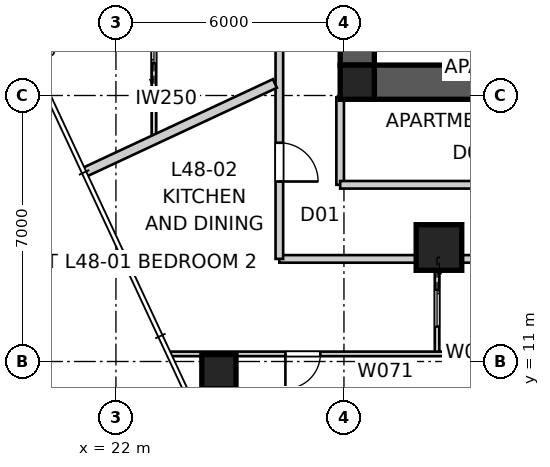
"""IFC4 building model, lengths in metres.
Left out: names, types, materials, properties, quantities, classifications, styles, units other than length and angle.
Written with IfcOpenShell. Run it as: python <this file> out.ifc"""

import sys

from ifc_helpers import new_model, si_unit, direction, frame, frame_2d, origin, origin_2d, place, context, subcontext, project, spatial, polyline, rectangle, outline, extrude, element, fill, save


model = new_model("IFC4")
c1 = context("Model", 3, precision=1e-05, world=origin(), true_north=direction((0.0, 1.0)))
c2 = subcontext(c1, "Body", "Model", "MODEL_VIEW")
j1 = project(units=[si_unit("LENGTHUNIT", "METRE"), si_unit("PLANEANGLEUNIT", "RADIAN")], contexts=[c1])
p1 = place(None, origin())
s1 = spatial("IfcSite", under=j1, at=p1, CompositionType="ELEMENT")
p2 = place(p1, origin())
s2 = spatial("IfcBuilding", under=s1, at=p2, CompositionType="ELEMENT")
p3 = place(p2, frame((0.0, 0.0, 176.0)))
s3 = spatial("IfcBuildingStorey", under=s2, at=p3, CompositionType="ELEMENT", Elevation=176.0)
p4 = place(p3, frame((51.2, 18.35, 0.0), z_axis=(0.0, 0.0, 1.0), x_axis=(-1.0, 0.0, 0.0)))
e1 = element("IfcWall", 1, at=p4, inside=s3, PredefinedType="SHEAR", context=c2, shape_type="SweptSolid", body=[
    extrude(outline(polyline([(0.0, -0.45), (22.4, -0.45), (22.4, -0.025), (22.85, -0.025), (22.85, 0.025), (22.4, 0.025), (22.4, 0.45), (0.0, 0.45), (0.0, 0.025), (-0.45, 0.025), (-0.45, -0.025), (0.0, -0.025), (0.0, -0.45)])), origin(), (0.0, 0.0, 1.0), 3.4),
])
p5 = place(p3, frame((28.35, 41.2, 0.0), z_axis=(0.0, 0.0, 1.0), x_axis=(0.0, -1.0, 0.0)))
e2 = element("IfcWall", 2, at=p5, inside=s3, PredefinedType="SHEAR", context=c2, shape_type="SweptSolid", body=[
    extrude(outline(polyline([(0.0, -0.45), (22.4, -0.45), (22.4, -0.025), (22.85, -0.025), (22.85, 0.025), (22.4, 0.025), (22.4, 0.45), (0.0, 0.45), (0.0, 0.025), (-0.45, 0.025), (-0.45, -0.025), (0.0, -0.025), (0.0, -0.45)])), origin(), (0.0, 0.0, 1.0), 3.4),
])
p6 = place(p5, frame((11.14, 0.0, 0.0)))
e3 = element("IfcOpeningElement", 3, at=p6, cuts=e2, PredefinedType="OPENING", context=c2, shape_type="SweptSolid", body=[
    extrude(rectangle(XDim=1.02, YDim=2.4, at=frame_2d((0.51, 1.2))), frame((0.0, 0.46, 0.0), z_axis=(0.0, -1.0, 0.0), x_axis=(1.0, 0.0, 0.0)), (0.0, 0.0, 1.0), 0.92),
])
p7 = place(p3, frame((28.35, 18.35, 0.0), z_axis=(0.0, 0.0, 1.0), x_axis=(1.0, 0.0, 0.0)))
e4 = element("IfcColumn", 4, at=p7, inside=s3, PredefinedType="COLUMN", context=c2, shape_type="SweptSolid", body=[
    extrude(rectangle(XDim=0.9, YDim=0.9, at=origin_2d()), origin(), (0.0, 0.0, 1.0), 3.4),
])
p8 = place(p3, frame((24.71, 10.733, -0.15), z_axis=(0.0, 0.0, 1.0), x_axis=(1.0, 0.0, 0.0)))
e5 = element("IfcColumn", 5, at=p8, inside=s3, PredefinedType="COLUMN", context=c2, shape_type="SweptSolid", body=[
    extrude(rectangle(XDim=0.9, YDim=0.9, at=origin_2d()), origin(), (0.0, 0.0, 1.0), 3.55),
])
p9 = place(p3, frame((30.5, 14.0, 0.0), z_axis=(0.0, 0.0, 1.0), x_axis=(1.0, 0.0, 0.0)))
e6 = element("IfcColumn", 6, at=p9, inside=s3, PredefinedType="COLUMN", context=c2, shape_type="SweptSolid", body=[
    extrude(rectangle(XDim=1.2, YDim=1.2, at=origin_2d()), origin(), (0.0, 0.0, 1.0), 3.4),
])
p10 = place(p3, frame((26.3, 13.7, 0.0), z_axis=(0.0, 0.0, 1.0), x_axis=(1.0, 0.0, 0.0)))
e7 = element("IfcWall", 7, at=p10, inside=s3, PredefinedType="PARTITIONING", context=c2, shape_type="SweptSolid", body=[
    extrude(rectangle(XDim=4.458, YDim=0.2, at=frame_2d((2.229, 0.0))), origin(), (0.0, 0.0, 1.0), 3.25),
])
p11 = place(p3, frame((30.758, 13.7, 0.0), z_axis=(0.0, 0.0, 1.0), x_axis=(1.0, 0.0, 0.0)))
e8 = element("IfcWall", 8, at=p11, inside=s3, PredefinedType="PARTITIONING", context=c2, shape_type="SweptSolid", body=[
    extrude(rectangle(XDim=1.683, YDim=0.2, at=frame_2d((0.842, 0.0))), origin(), (0.0, 0.0, 1.0), 2.55),
])
p12 = place(p3, frame((26.3, 46.3, 0.0), z_axis=(0.0, 0.0, 1.0), x_axis=(0.0, -1.0, 0.0)))
e9 = element("IfcWall", 9, at=p12, inside=s3, PredefinedType="PARTITIONING", context=c2, shape_type="SweptSolid", body=[
    extrude(rectangle(XDim=32.6, YDim=0.2, at=frame_2d((16.3, 0.0))), origin(), (0.0, 0.0, 1.0), 3.25),
])
p13 = place(p12, frame((3.156, 0.0, 0.0)))
e10 = element("IfcOpeningElement", 10, at=p13, cuts=e9, PredefinedType="OPENING", context=c2, shape_type="SweptSolid", body=[
    extrude(rectangle(XDim=1.02, YDim=2.1, at=frame_2d((0.51, 1.05))), frame((0.0, 0.11, 0.0), z_axis=(0.0, -1.0, 0.0), x_axis=(1.0, 0.0, 0.0)), (0.0, 0.0, 1.0), 0.22),
])
p14 = place(p12, frame((14.68, 0.0, 0.0)))
e11 = element("IfcOpeningElement", 11, at=p14, cuts=e9, PredefinedType="OPENING", context=c2, shape_type="SweptSolid", body=[
    extrude(rectangle(XDim=1.02, YDim=2.34, at=frame_2d((0.51, 1.17))), frame((0.0, 0.11, 0.0), z_axis=(0.0, -1.0, 0.0), x_axis=(1.0, 0.0, 0.0)), (0.0, 0.0, 1.0), 0.22),
])
p15 = place(p12, frame((29.543, 0.0, 0.0)))
e12 = element("IfcOpeningElement", 12, at=p15, cuts=e9, PredefinedType="OPENING", context=c2, shape_type="SweptSolid", body=[
    extrude(rectangle(XDim=1.02, YDim=2.34, at=frame_2d((0.51, 1.17))), frame((0.0, 0.11, 0.0), z_axis=(0.0, -1.0, 0.0), x_axis=(1.0, 0.0, 0.0)), (0.0, 0.0, 1.0), 0.22),
])
p16 = place(p3, frame((21.162, 15.975, 0.0), z_axis=(0.0, 0.0, 1.0), x_axis=(0.906309193024, 0.422615246577, 0.0)))
e13 = element("IfcWall", 13, at=p16, inside=s3, PredefinedType="PARTITIONING", context=c2, shape_type="SweptSolid", body=[
    extrude(rectangle(XDim=5.54, YDim=0.25, at=frame_2d((2.77, 0.0))), origin(), (0.0, 0.0, 1.0), 3.25),
])
p17 = place(p3, frame((27.9, 17.95, 0.0), z_axis=(0.0, 0.0, 1.0), x_axis=(0.0, -1.0, 0.0)))
e14 = element("IfcWall", 14, at=p17, inside=s3, PredefinedType="PARTITIONING", context=c2, shape_type="SweptSolid", body=[
    extrude(rectangle(XDim=2.3, YDim=0.2, at=frame_2d((1.15, 0.0))), origin(), (0.0, 0.0, 1.0), 3.25),
])
p18 = place(p3, frame((27.9, 15.65, 0.0), z_axis=(0.0, 0.0, 1.0), x_axis=(1.0, 0.0, 0.0)))
e15 = element("IfcWall", 15, at=p18, inside=s3, PredefinedType="PARTITIONING", context=c2, shape_type="SweptSolid", body=[
    extrude(rectangle(XDim=24.2, YDim=0.2, at=frame_2d((12.1, 0.0))), origin(), (0.0, 0.0, 1.0), 3.25),
])
p19 = place(p18, frame((4.391, 0.0, 0.0)))
e16 = element("IfcOpeningElement", 16, at=p19, cuts=e15, PredefinedType="OPENING", context=c2, shape_type="SweptSolid", body=[
    extrude(rectangle(XDim=1.02, YDim=2.1, at=frame_2d((0.51, 1.05))), frame((0.0, 0.11, 0.0), z_axis=(0.0, -1.0, 0.0), x_axis=(1.0, 0.0, 0.0)), (0.0, 0.0, 1.0), 0.22),
])
p20 = place(p18, frame((18.789, 0.0, 0.0)))
e17 = element("IfcOpeningElement", 17, at=p20, cuts=e15, PredefinedType="OPENING", context=c2, shape_type="SweptSolid", body=[
    extrude(rectangle(XDim=1.02, YDim=2.1, at=frame_2d((0.51, 1.05))), frame((0.0, 0.11, 0.0), z_axis=(0.0, -1.0, 0.0), x_axis=(1.0, 0.0, 0.0)), (0.0, 0.0, 1.0), 0.22),
])
p21 = place(p18, frame((11.59, 0.0, 0.0)))
e18 = element("IfcOpeningElement", 18, at=p21, cuts=e15, PredefinedType="OPENING", context=c2, shape_type="SweptSolid", body=[
    extrude(rectangle(XDim=1.02, YDim=2.1, at=frame_2d((0.51, 1.05))), frame((0.0, 0.11, 0.0), z_axis=(0.0, -1.0, 0.0), x_axis=(1.0, 0.0, 0.0)), (0.0, 0.0, 1.0), 0.22),
])
p22 = place(p3, frame((23.0, 16.832, 0.0), z_axis=(0.0, 0.0, 1.0), x_axis=(0.0, 1.0, 0.0)))
e19 = element("IfcWall", 19, at=p22, inside=s3, PredefinedType="PARTITIONING", context=c2, shape_type="SweptSolid", body=[
    extrude(rectangle(XDim=30.574, YDim=0.12, at=frame_2d((15.287, 0.0))), origin(), (0.0, 0.0, 1.0), 2.55),
])
p23 = place(p22, frame((26.093, 0.0, 0.0)))
e20 = element("IfcOpeningElement", 20, at=p23, cuts=e19, PredefinedType="OPENING", context=c2, shape_type="SweptSolid", body=[
    extrude(rectangle(XDim=0.92, YDim=2.34, at=frame_2d((0.46, 1.17))), frame((0.0, 0.07, 0.0), z_axis=(0.0, -1.0, 0.0), x_axis=(1.0, 0.0, 0.0)), (0.0, 0.0, 1.0), 0.14),
])
p24 = place(p22, frame((13.012, 0.0, 0.0)))
e21 = element("IfcOpeningElement", 21, at=p24, cuts=e19, PredefinedType="OPENING", context=c2, shape_type="SweptSolid", body=[
    extrude(rectangle(XDim=0.92, YDim=2.34, at=frame_2d((0.46, 1.17))), frame((0.0, 0.07, 0.0), z_axis=(0.0, -1.0, 0.0), x_axis=(1.0, 0.0, 0.0)), (0.0, 0.0, 1.0), 0.14),
])
p25 = place(p22, frame((19.16, 0.0, 0.0)))
e22 = element("IfcOpeningElement", 22, at=p25, cuts=e19, PredefinedType="OPENING", context=c2, shape_type="SweptSolid", body=[
    extrude(rectangle(XDim=0.96, YDim=2.1, at=frame_2d((0.48, 1.05))), frame((0.0, 0.07, 0.0), z_axis=(0.0, -1.0, 0.0), x_axis=(1.0, 0.0, 0.0)), (0.0, 0.0, 1.0), 0.14),
])
p26 = place(p22, frame((2.018, 0.0, 0.0)))
e23 = element("IfcOpeningElement", 23, at=p26, cuts=e19, PredefinedType="OPENING", context=c2, shape_type="SweptSolid", body=[
    extrude(rectangle(XDim=0.96, YDim=2.1, at=frame_2d((0.48, 1.05))), frame((0.0, 0.07, 0.0), z_axis=(0.0, -1.0, 0.0), x_axis=(1.0, 0.0, 0.0)), (0.0, 0.0, 1.0), 0.14),
])
p27 = place(p3, frame((30.45, 13.6, 0.0), z_axis=(0.0, 0.0, 1.0), x_axis=(0.0, -1.0, 0.0)))
e24 = element("IfcWall", 24, at=p27, inside=s3, PredefinedType="PARTITIONING", context=c2, shape_type="SweptSolid", body=[
    extrude(rectangle(XDim=2.4, YDim=0.12, at=frame_2d((1.2, 0.0))), origin(), (0.0, 0.0, 1.0), 3.25),
])
p28 = place(p27, frame((0.72, 0.0, 0.0)))
e25 = element("IfcOpeningElement", 25, at=p28, cuts=e24, PredefinedType="OPENING", context=c2, shape_type="SweptSolid", body=[
    extrude(rectangle(XDim=0.96, YDim=2.1, at=frame_2d((0.48, 1.05))), frame((0.0, 0.07, 0.0), z_axis=(0.0, -1.0, 0.0), x_axis=(1.0, 0.0, 0.0)), (0.0, 0.0, 1.0), 0.14),
])
p29 = place(p3, frame((33.099, 11.2, 0.0), z_axis=(0.0, 0.0, 1.0), x_axis=(-1.0, 0.0, 0.0)))
e26 = element("IfcWall", 26, at=p29, inside=s3, PredefinedType="PARTITIONING", context=c2, shape_type="SweptSolid", body=[
    extrude(rectangle(XDim=9.666, YDim=0.12, at=frame_2d((4.833, 0.0))), origin(), (0.0, 0.0, 1.0), 3.25),
])
p30 = place(p29, frame((5.719, 0.0, 0.0)))
e27 = element("IfcOpeningElement", 27, at=p30, cuts=e26, PredefinedType="OPENING", context=c2, shape_type="SweptSolid", body=[
    extrude(rectangle(XDim=0.92, YDim=2.34, at=frame_2d((0.46, 1.17))), frame((0.0, 0.07, 0.0), z_axis=(0.0, -1.0, 0.0), x_axis=(1.0, 0.0, 0.0)), (0.0, 0.0, 1.0), 0.14),
])
p31 = place(p3, frame((25.213, 7.382, 0.0), z_axis=(0.0, 0.0, 1.0), x_axis=(0.906314140712, 0.422604635972, 0.0)))
e28 = element("IfcWall", 28, at=p31, inside=s3, PredefinedType="PARTITIONING", context=c2, shape_type="SweptSolid", body=[
    extrude(rectangle(XDim=8.71, YDim=0.12, at=frame_2d((4.355, 0.0))), origin(), (0.0, 0.0, 1.0), 3.25),
])
p32 = place(p31, frame((3.875, 0.0, 0.0)))
e29 = element("IfcOpeningElement", 29, at=p32, cuts=e28, PredefinedType="OPENING", context=c2, shape_type="SweptSolid", body=[
    extrude(rectangle(XDim=0.92, YDim=2.34, at=frame_2d((0.46, 1.17))), frame((0.0, 0.07, 0.0), z_axis=(0.0, -1.0, 0.0), x_axis=(1.0, 0.0, 0.0)), (0.0, 0.0, 1.0), 0.14),
])
p33 = place(p15, origin())
e30 = element("IfcDoor", 30, at=p33, inside=s3, OperationType="SINGLE_SWING_RIGHT", PredefinedType="DOOR", context=c2, shape_type="SweptSolid", body=[
    extrude(rectangle(XDim=1.02, YDim=2.34, at=frame_2d((0.51, 1.17))), frame((0.0, 0.025, 0.0), z_axis=(0.0, -1.0, 0.0), x_axis=(1.0, 0.0, 0.0)), (0.0, 0.0, 1.0), 0.05),
])
fill(e12, e30)
p34 = place(p30, origin())
e31 = element("IfcDoor", 31, at=p34, inside=s3, OperationType="SINGLE_SWING_RIGHT", PredefinedType="DOOR", context=c2, shape_type="SweptSolid", body=[
    extrude(rectangle(XDim=0.92, YDim=2.34, at=frame_2d((0.46, 1.17))), frame((0.0, 0.025, 0.0), z_axis=(0.0, -1.0, 0.0), x_axis=(1.0, 0.0, 0.0)), (0.0, 0.0, 1.0), 0.05),
])
fill(e27, e31)
p35 = place(p28, origin())
e32 = element("IfcDoor", 32, at=p35, inside=s3, OperationType="SLIDING_TO_LEFT", PredefinedType="DOOR", context=c2, shape_type="SweptSolid", body=[
    extrude(rectangle(XDim=0.96, YDim=2.1, at=frame_2d((0.48, 1.05))), frame((0.0, 0.025, 0.0), z_axis=(0.0, -1.0, 0.0), x_axis=(1.0, 0.0, 0.0)), (0.0, 0.0, 1.0), 0.05),
])
fill(e25, e32)
p36 = place(p26, origin())
e33 = element("IfcDoor", 33, at=p36, inside=s3, OperationType="SLIDING_TO_LEFT", PredefinedType="DOOR", context=c2, shape_type="SweptSolid", body=[
    extrude(rectangle(XDim=0.96, YDim=2.1, at=frame_2d((0.48, 1.05))), frame((0.0, 0.025, 0.0), z_axis=(0.0, -1.0, 0.0), x_axis=(1.0, 0.0, 0.0)), (0.0, 0.0, 1.0), 0.05),
])
fill(e23, e33)
save(model, sys.argv[1])
